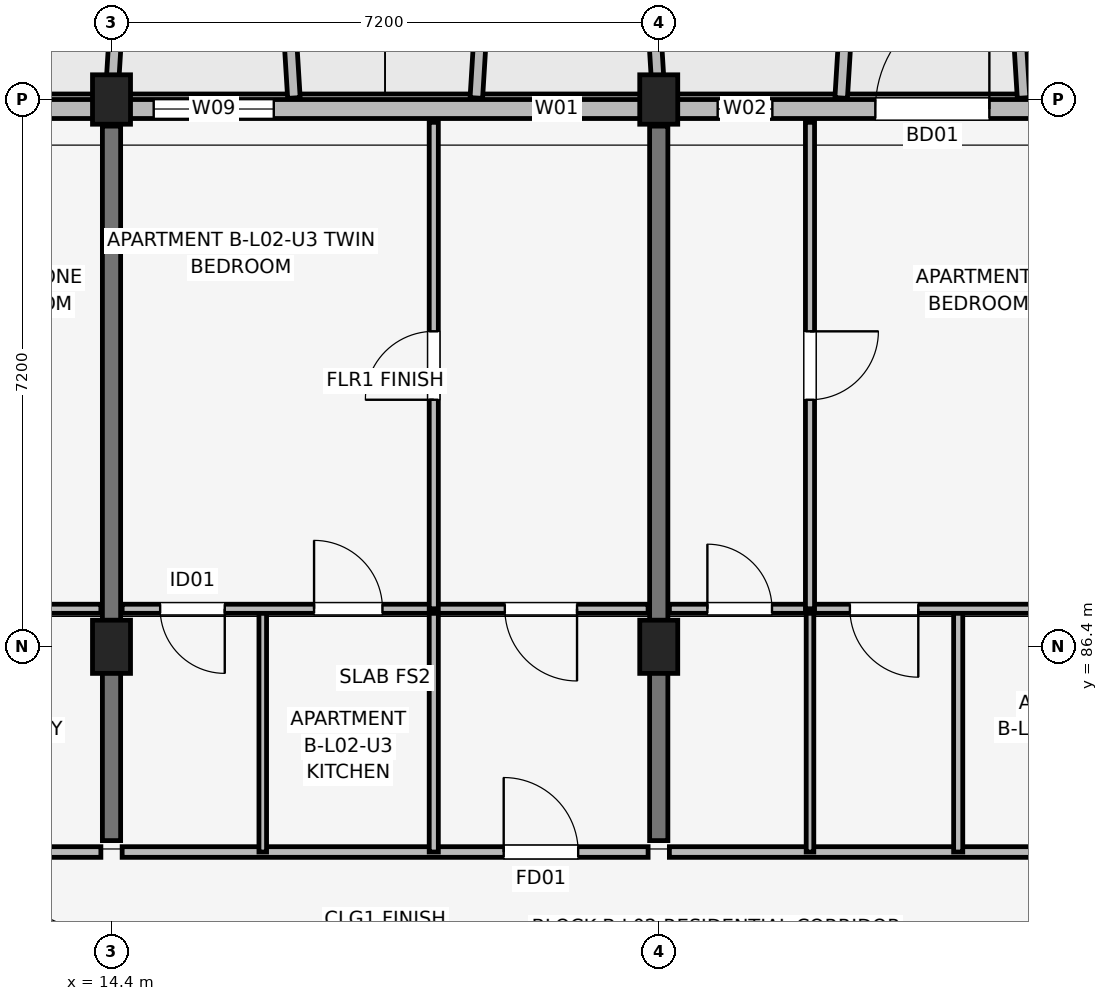
"""IFC4 building model, lengths in metres.
Left out: names, types, materials, properties, quantities, classifications, styles, units other than length and angle.
Written with IfcOpenShell. Run it as: python <this file> out.ifc"""

import sys

from ifc_helpers import new_model, si_unit, direction, frame, frame_2d, origin, origin_2d, place, context, subcontext, project, spatial, rectangle, extrude, element, fill, save


model = new_model("IFC4")
c1 = context("Model", 3, precision=1e-05, world=origin(), true_north=direction((0.0, 1.0)))
c2 = subcontext(c1, "Body", "Model", "MODEL_VIEW")
j1 = project(units=[si_unit("LENGTHUNIT", "METRE"), si_unit("PLANEANGLEUNIT", "RADIAN")], contexts=[c1])
p1 = place(None, origin())
s1 = spatial("IfcSite", under=j1, at=p1, CompositionType="ELEMENT")
p2 = place(p1, origin())
s2 = spatial("IfcBuilding", under=s1, at=p2, CompositionType="ELEMENT")
p3 = place(p2, frame((0.0, 0.0, 8.7)))
s3 = spatial("IfcBuildingStorey", under=s2, at=p3, CompositionType="ELEMENT", Elevation=8.7)
p4 = place(p3, frame((14.4, 86.4, 0.0), z_axis=(0.0, 0.0, 1.0), x_axis=(1.0, 0.0, 0.0)))
e1 = element("IfcColumn", 1, at=p4, inside=s3, PredefinedType="COLUMN", context=c2, shape_type="SweptSolid", body=[
    extrude(rectangle(XDim=0.5, YDim=0.7, at=origin_2d()), origin(), (0.0, 0.0, 1.0), 3.15),
])
p5 = place(p3, frame((14.4, 93.6, 0.0), z_axis=(0.0, 0.0, 1.0), x_axis=(1.0, 0.0, 0.0)))
e2 = element("IfcColumn", 2, at=p5, inside=s3, PredefinedType="COLUMN", context=c2, shape_type="SweptSolid", body=[
    extrude(rectangle(XDim=0.5, YDim=0.65, at=origin_2d()), origin(), (0.0, 0.0, 1.0), 3.15),
])
p6 = place(p3, frame((21.6, 86.4, 0.0), z_axis=(0.0, 0.0, 1.0), x_axis=(1.0, 0.0, 0.0)))
e3 = element("IfcColumn", 3, at=p6, inside=s3, PredefinedType="COLUMN", context=c2, shape_type="SweptSolid", body=[
    extrude(rectangle(XDim=0.5, YDim=0.7, at=origin_2d()), origin(), (0.0, 0.0, 1.0), 3.15),
])
p7 = place(p3, frame((21.6, 93.6, 0.0), z_axis=(0.0, 0.0, 1.0), x_axis=(1.0, 0.0, 0.0)))
e4 = element("IfcColumn", 4, at=p7, inside=s3, PredefinedType="COLUMN", context=c2, shape_type="SweptSolid", body=[
    extrude(rectangle(XDim=0.5, YDim=0.65, at=origin_2d()), origin(), (0.0, 0.0, 1.0), 3.15),
])
for number, where, z_axis, x_axis in (
    (5, (14.4, 83.85, 0.0), (0.0, 0.0, 1.0), (0.0, 1.0, 0.0)),
    (6, (21.6, 83.85, 0.0), (0.0, 0.0, 1.0), (0.0, 1.0, 0.0)),
):
    element("IfcWall", number, at=place(p3, frame(where, z_axis=z_axis, x_axis=x_axis)), inside=s3, PredefinedType="SHEAR", context=c2, shape_type="SweptSolid", body=[
        extrude(rectangle(XDim=9.4, YDim=0.24, at=frame_2d((4.7, 0.0))), origin(), (0.0, 0.0, 1.0), 3.15),
    ])
p8 = place(p3, frame((32.8, 93.475, 0.0), z_axis=(0.0, 0.0, 1.0), x_axis=(-1.0, 0.0, 0.0)))
e7 = element("IfcWall", 7, at=p8, inside=s3, PredefinedType="SOLIDWALL", context=c2, shape_type="SweptSolid", body=[
    extrude(rectangle(XDim=29.6, YDim=0.25, at=frame_2d((14.8, 0.0))), origin(), (0.0, 0.0, 1.0), 2.43),
])
p9 = place(p8, frame((22.825, 0.0, 0.0), z_axis=(0.0, 0.0, 1.0), x_axis=(-1.0, 0.0, 0.0)))
e8 = element("IfcOpeningElement", 8, at=p9, cuts=e7, PredefinedType="OPENING", context=c2, shape_type="SweptSolid", body=[
    extrude(rectangle(XDim=1.65, YDim=2.15, at=frame_2d((0.825, 1.075))), frame((0.0, 0.135, 0.0), z_axis=(0.0, -1.0, 0.0), x_axis=(1.0, 0.0, 0.0)), (0.0, 0.0, 1.0), 0.27),
])
p10 = place(p8, frame((8.35, 0.0, 0.0), z_axis=(0.0, 0.0, 1.0), x_axis=(-1.0, 0.0, 0.0)))
e9 = element("IfcOpeningElement", 9, at=p10, cuts=e7, PredefinedType="OPENING", context=c2, shape_type="SweptSolid", body=[
    extrude(rectangle(XDim=1.5, YDim=2.15, at=frame_2d((0.75, 1.075))), frame((0.0, 0.135, 0.0), z_axis=(0.0, -1.0, 0.0), x_axis=(1.0, 0.0, 0.0)), (0.0, 0.0, 1.0), 0.27),
])
p11 = place(p8, frame((26.025, 0.0, 0.75)))
e10 = element("IfcOpeningElement", 10, at=p11, cuts=e7, PredefinedType="OPENING", context=c2, shape_type="SweptSolid", body=[
    extrude(rectangle(XDim=1.22, YDim=1.5, at=frame_2d((0.61, 0.75))), frame((0.0, 0.135, 0.0), z_axis=(0.0, -1.0, 0.0), x_axis=(1.0, 0.0, 0.0)), (0.0, 0.0, 1.0), 0.27),
])
p12 = place(p8, frame((23.795, 0.0, 0.75)))
e11 = element("IfcOpeningElement", 11, at=p12, cuts=e7, PredefinedType="OPENING", context=c2, shape_type="SweptSolid", body=[
    extrude(rectangle(XDim=1.34, YDim=1.55, at=frame_2d((0.67, 0.775))), frame((0.0, 0.135, 0.0), z_axis=(0.0, -1.0, 0.0), x_axis=(1.0, 0.0, 0.0)), (0.0, 0.0, 1.0), 0.27),
])
p13 = place(p8, frame((16.265, 0.0, 0.7)))
e12 = element("IfcOpeningElement", 12, at=p13, cuts=e7, PredefinedType="OPENING", context=c2, shape_type="SweptSolid", body=[
    extrude(rectangle(XDim=1.58, YDim=1.6, at=frame_2d((0.79, 0.8))), frame((0.0, 0.135, 0.0), z_axis=(0.0, -1.0, 0.0), x_axis=(1.0, 0.0, 0.0)), (0.0, 0.0, 1.0), 0.27),
])
p14 = place(p8, frame((12.245, 0.0, 0.75)))
e13 = element("IfcOpeningElement", 13, at=p14, cuts=e7, PredefinedType="OPENING", context=c2, shape_type="SweptSolid", body=[
    extrude(rectangle(XDim=0.6, YDim=1.25, at=frame_2d((0.3, 0.625))), frame((0.0, 0.135, 0.0), z_axis=(0.0, -1.0, 0.0), x_axis=(1.0, 0.0, 0.0)), (0.0, 0.0, 1.0), 0.27),
])
p15 = place(p8, frame((9.705, 0.0, 0.75)))
e14 = element("IfcOpeningElement", 14, at=p15, cuts=e7, PredefinedType="OPENING", context=c2, shape_type="SweptSolid", body=[
    extrude(rectangle(XDim=0.72, YDim=1.35, at=frame_2d((0.36, 0.675))), frame((0.0, 0.135, 0.0), z_axis=(0.0, -1.0, 0.0), x_axis=(1.0, 0.0, 0.0)), (0.0, 0.0, 1.0), 0.27),
])
p16 = place(p8, frame((2.44, 0.0, 0.75)))
e15 = element("IfcOpeningElement", 15, at=p16, cuts=e7, PredefinedType="OPENING", context=c2, shape_type="SweptSolid", body=[
    extrude(rectangle(XDim=0.85, YDim=1.4, at=frame_2d((0.425, 0.7))), frame((0.0, 0.135, 0.0), z_axis=(0.0, -1.0, 0.0), x_axis=(1.0, 0.0, 0.0)), (0.0, 0.0, 1.0), 0.27),
])
p17 = place(p3, frame((14.4, 93.62, 0.0), z_axis=(0.0, 0.0, 1.0), x_axis=(0.061170732449, 0.998127317276, 0.0)))
e16 = element("IfcWall", 16, at=p17, inside=s3, PredefinedType="ELEMENTEDWALL", context=c2, shape_type="SweptSolid", body=[
    extrude(rectangle(XDim=1.964, YDim=0.165, at=frame_2d((0.982, 0.0))), origin(), (0.0, 0.0, 1.0), 2.95),
])
for number, where, z_axis, x_axis in (
    (17, (16.8, 93.62, 0.0), (0.0, 0.0, 1.0), (-0.061, 0.998, 0.0)),
    (18, (19.2, 93.62, 0.0), (0.0, 0.0, 1.0), (0.061, 0.998, 0.0)),
):
    element("IfcWall", number, at=place(p3, frame(where, z_axis=z_axis, x_axis=x_axis)), inside=s3, PredefinedType="ELEMENTEDWALL", context=c2, shape_type="SweptSolid", body=[
        extrude(rectangle(XDim=1.964, YDim=0.165, at=frame_2d((0.982, 0.0))), origin(), (0.0, 0.0, 1.0), 2.58),
    ])
p18 = place(p3, frame((21.6, 93.62, 0.0), z_axis=(0.0, 0.0, 1.0), x_axis=(-0.061170732449, 0.998127317276, 0.0)))
e19 = element("IfcWall", 19, at=p18, inside=s3, PredefinedType="ELEMENTEDWALL", context=c2, shape_type="SweptSolid", body=[
    extrude(rectangle(XDim=1.964, YDim=0.165, at=frame_2d((0.982, 0.0))), origin(), (0.0, 0.0, 1.0), 2.95),
])
for number, where, z_axis, x_axis in (
    (20, (24.0, 93.62, 0.0), (0.0, 0.0, 1.0), (0.061, 0.998, 0.0)),
    (21, (26.4, 93.62, 0.0), (0.0, 0.0, 1.0), (-0.061, 0.998, 0.0)),
):
    element("IfcWall", number, at=place(p3, frame(where, z_axis=z_axis, x_axis=x_axis)), inside=s3, PredefinedType="ELEMENTEDWALL", context=c2, shape_type="SweptSolid", body=[
        extrude(rectangle(XDim=1.964, YDim=0.165, at=frame_2d((0.982, 0.0))), origin(), (0.0, 0.0, 1.0), 2.45),
    ])
p19 = place(p3, frame((7.34, 83.7, 0.0), z_axis=(0.0, 0.0, 1.0), x_axis=(1.0, 0.0, 0.0)))
e22 = element("IfcWall", 22, at=p19, inside=s3, PredefinedType="PARTITIONING", context=c2, shape_type="SweptSolid", body=[
    extrude(rectangle(XDim=6.92, YDim=0.14, at=frame_2d((3.46, 0.0))), origin(), (0.0, 0.0, 1.0), 2.38),
])
p20 = place(p19, frame((5.85, 0.0, 0.0), z_axis=(0.0, 0.0, 1.0), x_axis=(-1.0, 0.0, 0.0)))
e23 = element("IfcOpeningElement", 23, at=p20, cuts=e22, PredefinedType="OPENING", context=c2, shape_type="SweptSolid", body=[
    extrude(rectangle(XDim=0.98, YDim=2.1, at=frame_2d((0.49, 1.05))), frame((0.0, 0.08, 0.0), z_axis=(0.0, -1.0, 0.0), x_axis=(1.0, 0.0, 0.0)), (0.0, 0.0, 1.0), 0.16),
])
p21 = place(p3, frame((7.34, 86.9, 0.0), z_axis=(0.0, 0.0, 1.0), x_axis=(1.0, 0.0, 0.0)))
e24 = element("IfcWall", 24, at=p21, inside=s3, PredefinedType="PARTITIONING", context=c2, shape_type="SweptSolid", body=[
    extrude(rectangle(XDim=6.92, YDim=0.12, at=frame_2d((3.46, 0.0))), origin(), (0.0, 0.0, 1.0), 2.38),
])
p22 = place(p21, frame((0.5, 0.0, 0.0)))
e25 = element("IfcOpeningElement", 25, at=p22, cuts=e24, PredefinedType="OPENING", context=c2, shape_type="SweptSolid", body=[
    extrude(rectangle(XDim=0.85, YDim=2.08, at=frame_2d((0.425, 1.04))), frame((0.0, 0.07, 0.0), z_axis=(0.0, -1.0, 0.0), x_axis=(1.0, 0.0, 0.0)), (0.0, 0.0, 1.0), 0.14),
])
p23 = place(p21, frame((3.275, 0.0, 0.0), z_axis=(0.0, 0.0, 1.0), x_axis=(-1.0, 0.0, 0.0)))
e26 = element("IfcOpeningElement", 26, at=p23, cuts=e24, PredefinedType="OPENING", context=c2, shape_type="SweptSolid", body=[
    extrude(rectangle(XDim=0.9, YDim=2.08, at=frame_2d((0.45, 1.04))), frame((0.0, 0.07, 0.0), z_axis=(0.0, -1.0, 0.0), x_axis=(1.0, 0.0, 0.0)), (0.0, 0.0, 1.0), 0.14),
])
p24 = place(p21, frame((4.885, 0.0, 0.0)))
e27 = element("IfcOpeningElement", 27, at=p24, cuts=e24, PredefinedType="OPENING", context=c2, shape_type="SweptSolid", body=[
    extrude(rectangle(XDim=0.95, YDim=2.08, at=frame_2d((0.475, 1.04))), frame((0.0, 0.07, 0.0), z_axis=(0.0, -1.0, 0.0), x_axis=(1.0, 0.0, 0.0)), (0.0, 0.0, 1.0), 0.14),
])
p25 = place(p3, frame((14.54, 83.7, 0.0), z_axis=(0.0, 0.0, 1.0), x_axis=(1.0, 0.0, 0.0)))
e28 = element("IfcWall", 28, at=p25, inside=s3, PredefinedType="PARTITIONING", context=c2, shape_type="SweptSolid", body=[
    extrude(rectangle(XDim=6.92, YDim=0.14, at=frame_2d((3.46, 0.0))), origin(), (0.0, 0.0, 1.0), 2.38),
])
p26 = place(p25, frame((5.02, 0.0, 0.0)))
e29 = element("IfcOpeningElement", 29, at=p26, cuts=e28, PredefinedType="OPENING", context=c2, shape_type="SweptSolid", body=[
    extrude(rectangle(XDim=0.98, YDim=2.1, at=frame_2d((0.49, 1.05))), frame((0.0, 0.08, 0.0), z_axis=(0.0, -1.0, 0.0), x_axis=(1.0, 0.0, 0.0)), (0.0, 0.0, 1.0), 0.16),
])
p27 = place(p3, frame((16.39, 83.7, 0.0), z_axis=(0.0, 0.0, 1.0), x_axis=(0.0, 1.0, 0.0)))
e30 = element("IfcWall", 30, at=p27, inside=s3, PredefinedType="PARTITIONING", context=c2, shape_type="SweptSolid", body=[
    extrude(rectangle(XDim=3.2, YDim=0.1, at=frame_2d((1.6, 0.0))), origin(), (0.0, 0.0, 1.0), 2.375),
])
p28 = place(p3, frame((18.64, 83.7, 0.0), z_axis=(0.0, 0.0, 1.0), x_axis=(0.0, 1.0, 0.0)))
e31 = element("IfcWall", 31, at=p28, inside=s3, PredefinedType="PARTITIONING", context=c2, shape_type="SweptSolid", body=[
    extrude(rectangle(XDim=3.2, YDim=0.12, at=frame_2d((1.6, 0.0))), origin(), (0.0, 0.0, 1.0), 2.375),
])
p29 = place(p3, frame((14.54, 86.9, 0.0), z_axis=(0.0, 0.0, 1.0), x_axis=(1.0, 0.0, 0.0)))
e32 = element("IfcWall", 32, at=p29, inside=s3, PredefinedType="PARTITIONING", context=c2, shape_type="SweptSolid", body=[
    extrude(rectangle(XDim=6.92, YDim=0.12, at=frame_2d((3.46, 0.0))), origin(), (0.0, 0.0, 1.0), 2.38),
])
p30 = place(p29, frame((1.35, 0.0, 0.0), z_axis=(0.0, 0.0, 1.0), x_axis=(-1.0, 0.0, 0.0)))
e33 = element("IfcOpeningElement", 33, at=p30, cuts=e32, PredefinedType="OPENING", context=c2, shape_type="SweptSolid", body=[
    extrude(rectangle(XDim=0.85, YDim=2.08, at=frame_2d((0.425, 1.04))), frame((0.0, 0.07, 0.0), z_axis=(0.0, -1.0, 0.0), x_axis=(1.0, 0.0, 0.0)), (0.0, 0.0, 1.0), 0.14),
])
p31 = place(p29, frame((2.525, 0.0, 0.0)))
e34 = element("IfcOpeningElement", 34, at=p31, cuts=e32, PredefinedType="OPENING", context=c2, shape_type="SweptSolid", body=[
    extrude(rectangle(XDim=0.9, YDim=2.08, at=frame_2d((0.45, 1.04))), frame((0.0, 0.07, 0.0), z_axis=(0.0, -1.0, 0.0), x_axis=(1.0, 0.0, 0.0)), (0.0, 0.0, 1.0), 0.14),
])
p32 = place(p29, frame((5.985, 0.0, 0.0), z_axis=(0.0, 0.0, 1.0), x_axis=(-1.0, 0.0, 0.0)))
e35 = element("IfcOpeningElement", 35, at=p32, cuts=e32, PredefinedType="OPENING", context=c2, shape_type="SweptSolid", body=[
    extrude(rectangle(XDim=0.95, YDim=2.08, at=frame_2d((0.475, 1.04))), frame((0.0, 0.07, 0.0), z_axis=(0.0, -1.0, 0.0), x_axis=(1.0, 0.0, 0.0)), (0.0, 0.0, 1.0), 0.14),
])
p33 = place(p3, frame((18.64, 86.9, 0.0), z_axis=(0.0, 0.0, 1.0), x_axis=(0.0, 1.0, 0.0)))
e36 = element("IfcWall", 36, at=p33, inside=s3, PredefinedType="PARTITIONING", context=c2, shape_type="SweptSolid", body=[
    extrude(rectangle(XDim=6.4, YDim=0.12, at=frame_2d((3.2, 0.0))), origin(), (0.0, 0.0, 1.0), 2.38),
])
p34 = place(p33, frame((2.75, 0.0, 0.0)))
e37 = element("IfcOpeningElement", 37, at=p34, cuts=e36, PredefinedType="OPENING", context=c2, shape_type="SweptSolid", body=[
    extrude(rectangle(XDim=0.9, YDim=2.08, at=frame_2d((0.45, 1.04))), frame((0.0, 0.07, 0.0), z_axis=(0.0, -1.0, 0.0), x_axis=(1.0, 0.0, 0.0)), (0.0, 0.0, 1.0), 0.14),
])
p35 = place(p3, frame((21.74, 83.7, 0.0), z_axis=(0.0, 0.0, 1.0), x_axis=(1.0, 0.0, 0.0)))
e38 = element("IfcWall", 38, at=p35, inside=s3, PredefinedType="PARTITIONING", context=c2, shape_type="SweptSolid", body=[
    extrude(rectangle(XDim=6.92, YDim=0.14, at=frame_2d((3.46, 0.0))), origin(), (0.0, 0.0, 1.0), 2.38),
])
p36 = place(p35, frame((5.85, 0.0, 0.0), z_axis=(0.0, 0.0, 1.0), x_axis=(-1.0, 0.0, 0.0)))
e39 = element("IfcOpeningElement", 39, at=p36, cuts=e38, PredefinedType="OPENING", context=c2, shape_type="SweptSolid", body=[
    extrude(rectangle(XDim=0.98, YDim=2.1, at=frame_2d((0.49, 1.05))), frame((0.0, 0.08, 0.0), z_axis=(0.0, -1.0, 0.0), x_axis=(1.0, 0.0, 0.0)), (0.0, 0.0, 1.0), 0.16),
])
p37 = place(p3, frame((23.59, 83.7, 0.0), z_axis=(0.0, 0.0, 1.0), x_axis=(0.0, 1.0, 0.0)))
e40 = element("IfcWall", 40, at=p37, inside=s3, PredefinedType="PARTITIONING", context=c2, shape_type="SweptSolid", body=[
    extrude(rectangle(XDim=3.2, YDim=0.1, at=frame_2d((1.6, 0.0))), origin(), (0.0, 0.0, 1.0), 2.375),
])
p38 = place(p3, frame((25.54, 83.7, 0.0), z_axis=(0.0, 0.0, 1.0), x_axis=(0.0, 1.0, 0.0)))
e41 = element("IfcWall", 41, at=p38, inside=s3, PredefinedType="PARTITIONING", context=c2, shape_type="SweptSolid", body=[
    extrude(rectangle(XDim=3.2, YDim=0.12, at=frame_2d((1.6, 0.0))), origin(), (0.0, 0.0, 1.0), 2.375),
])
p39 = place(p3, frame((21.74, 86.9, 0.0), z_axis=(0.0, 0.0, 1.0), x_axis=(1.0, 0.0, 0.0)))
e42 = element("IfcWall", 42, at=p39, inside=s3, PredefinedType="PARTITIONING", context=c2, shape_type="SweptSolid", body=[
    extrude(rectangle(XDim=6.92, YDim=0.12, at=frame_2d((3.46, 0.0))), origin(), (0.0, 0.0, 1.0), 2.38),
])
p40 = place(p39, frame((0.5, 0.0, 0.0)))
e43 = element("IfcOpeningElement", 43, at=p40, cuts=e42, PredefinedType="OPENING", context=c2, shape_type="SweptSolid", body=[
    extrude(rectangle(XDim=0.85, YDim=2.08, at=frame_2d((0.425, 1.04))), frame((0.0, 0.07, 0.0), z_axis=(0.0, -1.0, 0.0), x_axis=(1.0, 0.0, 0.0)), (0.0, 0.0, 1.0), 0.14),
])
p41 = place(p39, frame((3.275, 0.0, 0.0), z_axis=(0.0, 0.0, 1.0), x_axis=(-1.0, 0.0, 0.0)))
e44 = element("IfcOpeningElement", 44, at=p41, cuts=e42, PredefinedType="OPENING", context=c2, shape_type="SweptSolid", body=[
    extrude(rectangle(XDim=0.9, YDim=2.08, at=frame_2d((0.45, 1.04))), frame((0.0, 0.07, 0.0), z_axis=(0.0, -1.0, 0.0), x_axis=(1.0, 0.0, 0.0)), (0.0, 0.0, 1.0), 0.14),
])
p42 = place(p39, frame((4.885, 0.0, 0.0)))
e45 = element("IfcOpeningElement", 45, at=p42, cuts=e42, PredefinedType="OPENING", context=c2, shape_type="SweptSolid", body=[
    extrude(rectangle(XDim=0.95, YDim=2.08, at=frame_2d((0.475, 1.04))), frame((0.0, 0.07, 0.0), z_axis=(0.0, -1.0, 0.0), x_axis=(1.0, 0.0, 0.0)), (0.0, 0.0, 1.0), 0.14),
])
p43 = place(p3, frame((23.59, 86.9, 0.0), z_axis=(0.0, 0.0, 1.0), x_axis=(0.0, 1.0, 0.0)))
e46 = element("IfcWall", 46, at=p43, inside=s3, PredefinedType="PARTITIONING", context=c2, shape_type="SweptSolid", body=[
    extrude(rectangle(XDim=6.4, YDim=0.12, at=frame_2d((3.2, 0.0))), origin(), (0.0, 0.0, 1.0), 2.38),
])
p44 = place(p43, frame((3.65, 0.0, 0.0), z_axis=(0.0, 0.0, 1.0), x_axis=(-1.0, 0.0, 0.0)))
e47 = element("IfcOpeningElement", 47, at=p44, cuts=e46, PredefinedType="OPENING", context=c2, shape_type="SweptSolid", body=[
    extrude(rectangle(XDim=0.9, YDim=2.08, at=frame_2d((0.45, 1.04))), frame((0.0, 0.07, 0.0), z_axis=(0.0, -1.0, 0.0), x_axis=(1.0, 0.0, 0.0)), (0.0, 0.0, 1.0), 0.14),
])
p45 = place(p10, origin())
e48 = element("IfcDoor", 48, at=p45, inside=s3, OperationType="SINGLE_SWING_LEFT", PredefinedType="DOOR", context=c2, shape_type="SweptSolid", body=[
    extrude(rectangle(XDim=1.5, YDim=2.15, at=frame_2d((0.75, 1.075))), frame((0.0, 0.025, 0.0), z_axis=(0.0, -1.0, 0.0), x_axis=(1.0, 0.0, 0.0)), (0.0, 0.0, 1.0), 0.05),
])
fill(e9, e48)
p46 = place(p13, origin())
e49 = element("IfcWindow", 49, at=p46, inside=s3, PartitioningType="SINGLE_PANEL", PredefinedType="WINDOW", context=c2, shape_type="SweptSolid", body=[
    extrude(rectangle(XDim=1.58, YDim=1.6, at=frame_2d((0.79, 0.8))), frame((0.0, 0.03, 0.0), z_axis=(0.0, -1.0, 0.0), x_axis=(1.0, 0.0, 0.0)), (0.0, 0.0, 1.0), 0.06),
])
fill(e12, e49)
p47 = place(p14, origin())
e50 = element("IfcWindow", 50, at=p47, inside=s3, PartitioningType="SINGLE_PANEL", PredefinedType="WINDOW", context=c2, shape_type="SweptSolid", body=[
    extrude(rectangle(XDim=0.6, YDim=1.25, at=frame_2d((0.3, 0.625))), frame((0.0, 0.03, 0.0), z_axis=(0.0, -1.0, 0.0), x_axis=(1.0, 0.0, 0.0)), (0.0, 0.0, 1.0), 0.06),
])
fill(e13, e50)
p48 = place(p15, origin())
e51 = element("IfcWindow", 51, at=p48, inside=s3, PartitioningType="SINGLE_PANEL", PredefinedType="WINDOW", context=c2, shape_type="SweptSolid", body=[
    extrude(rectangle(XDim=0.72, YDim=1.35, at=frame_2d((0.36, 0.675))), frame((0.0, 0.03, 0.0), z_axis=(0.0, -1.0, 0.0), x_axis=(1.0, 0.0, 0.0)), (0.0, 0.0, 1.0), 0.06),
])
fill(e14, e51)
p49 = place(p26, origin())
e52 = element("IfcDoor", 52, at=p49, inside=s3, OperationType="SINGLE_SWING_LEFT", PredefinedType="DOOR", context=c2, shape_type="SweptSolid", body=[
    extrude(rectangle(XDim=0.98, YDim=2.1, at=frame_2d((0.49, 1.05))), frame((0.0, 0.025, 0.0), z_axis=(0.0, -1.0, 0.0), x_axis=(1.0, 0.0, 0.0)), (0.0, 0.0, 1.0), 0.05),
])
fill(e29, e52)
p50 = place(p30, origin())
e53 = element("IfcDoor", 53, at=p50, inside=s3, OperationType="SINGLE_SWING_RIGHT", PredefinedType="DOOR", context=c2, shape_type="SweptSolid", body=[
    extrude(rectangle(XDim=0.85, YDim=2.08, at=frame_2d((0.425, 1.04))), frame((0.0, 0.025, 0.0), z_axis=(0.0, -1.0, 0.0), x_axis=(1.0, 0.0, 0.0)), (0.0, 0.0, 1.0), 0.05),
])
fill(e33, e53)
p51 = place(p31, origin())
e54 = element("IfcDoor", 54, at=p51, inside=s3, OperationType="SINGLE_SWING_LEFT", PredefinedType="DOOR", context=c2, shape_type="SweptSolid", body=[
    extrude(rectangle(XDim=0.9, YDim=2.08, at=frame_2d((0.45, 1.04))), frame((0.0, 0.025, 0.0), z_axis=(0.0, -1.0, 0.0), x_axis=(1.0, 0.0, 0.0)), (0.0, 0.0, 1.0), 0.05),
])
fill(e34, e54)
p52 = place(p32, origin())
e55 = element("IfcDoor", 55, at=p52, inside=s3, OperationType="SINGLE_SWING_RIGHT", PredefinedType="DOOR", context=c2, shape_type="SweptSolid", body=[
    extrude(rectangle(XDim=0.95, YDim=2.08, at=frame_2d((0.475, 1.04))), frame((0.0, 0.025, 0.0), z_axis=(0.0, -1.0, 0.0), x_axis=(1.0, 0.0, 0.0)), (0.0, 0.0, 1.0), 0.05),
])
fill(e35, e55)
p53 = place(p34, origin())
e56 = element("IfcDoor", 56, at=p53, inside=s3, OperationType="SINGLE_SWING_LEFT", PredefinedType="DOOR", context=c2, shape_type="SweptSolid", body=[
    extrude(rectangle(XDim=0.9, YDim=2.08, at=frame_2d((0.45, 1.04))), frame((0.0, 0.025, 0.0), z_axis=(0.0, -1.0, 0.0), x_axis=(1.0, 0.0, 0.0)), (0.0, 0.0, 1.0), 0.05),
])
fill(e37, e56)
p54 = place(p40, origin())
e57 = element("IfcDoor", 57, at=p54, inside=s3, OperationType="SINGLE_SWING_LEFT", PredefinedType="DOOR", context=c2, shape_type="SweptSolid", body=[
    extrude(rectangle(XDim=0.85, YDim=2.08, at=frame_2d((0.425, 1.04))), frame((0.0, 0.025, 0.0), z_axis=(0.0, -1.0, 0.0), x_axis=(1.0, 0.0, 0.0)), (0.0, 0.0, 1.0), 0.05),
])
fill(e43, e57)
p55 = place(p41, origin())
e58 = element("IfcDoor", 58, at=p55, inside=s3, OperationType="SINGLE_SWING_RIGHT", PredefinedType="DOOR", context=c2, shape_type="SweptSolid", body=[
    extrude(rectangle(XDim=0.9, YDim=2.08, at=frame_2d((0.45, 1.04))), frame((0.0, 0.025, 0.0), z_axis=(0.0, -1.0, 0.0), x_axis=(1.0, 0.0, 0.0)), (0.0, 0.0, 1.0), 0.05),
])
fill(e44, e58)
p56 = place(p44, origin())
e59 = element("IfcDoor", 59, at=p56, inside=s3, OperationType="SINGLE_SWING_RIGHT", PredefinedType="DOOR", context=c2, shape_type="SweptSolid", body=[
    extrude(rectangle(XDim=0.9, YDim=2.08, at=frame_2d((0.45, 1.04))), frame((0.0, 0.025, 0.0), z_axis=(0.0, -1.0, 0.0), x_axis=(1.0, 0.0, 0.0)), (0.0, 0.0, 1.0), 0.05),
])
fill(e47, e59)
save(model, sys.argv[1])
